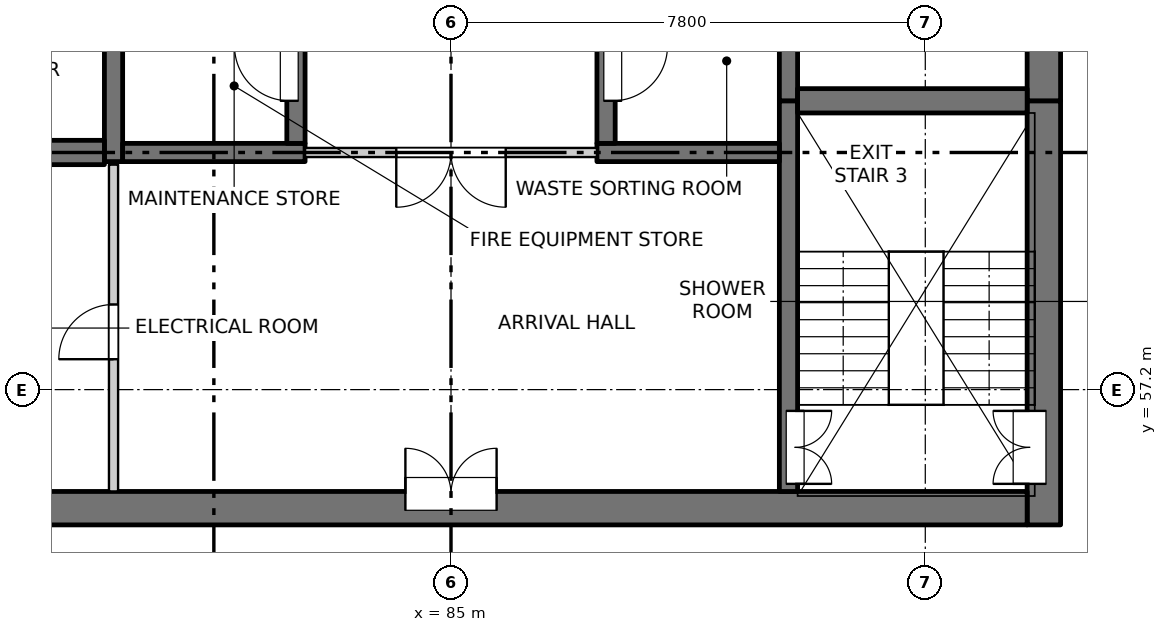
"""IFC4 building model, lengths in metres.
Left out: names, types, materials, properties, quantities, classifications, styles, units other than length and angle.
Written with IfcOpenShell. Run it as: python <this file> out.ifc"""

import sys

from ifc_helpers import new_model, si_unit, direction, frame, frame_2d, origin, place, context, subcontext, project, spatial, rectangle, extrude, element, fill, save


model = new_model("IFC4")
c1 = context("Model", 3, precision=1e-05, world=origin(), true_north=direction((0.0, 1.0)))
c2 = subcontext(c1, "Body", "Model", "MODEL_VIEW")
j1 = project(units=[si_unit("LENGTHUNIT", "METRE"), si_unit("PLANEANGLEUNIT", "RADIAN")], contexts=[c1])
p1 = place(None, origin())
s1 = spatial("IfcSite", under=j1, at=p1, CompositionType="ELEMENT")
p2 = place(p1, origin())
s2 = spatial("IfcBuilding", under=s1, at=p2, CompositionType="ELEMENT")
p3 = place(p2, frame((0.0, 0.0, 182.6)))
s3 = spatial("IfcBuildingStorey", under=s2, at=p3, CompositionType="ELEMENT", Elevation=182.6)
p4 = place(p3, frame((94.75, 54.975, -0.25), z_axis=(0.0, 0.0, 1.0), x_axis=(0.0, 1.0, 0.0)))
e1 = element("IfcWall", 1, at=p4, inside=s3, PredefinedType="SOLIDWALL", context=c2, shape_type="SweptSolid", body=[
    extrude(rectangle(XDim=6.975, YDim=0.55, at=frame_2d((3.487, 0.0))), origin(), (0.0, 0.0, 1.0), 3.4),
])
p5 = place(p4, frame((0.675, 0.0, 0.25)))
e2 = element("IfcOpeningElement", 2, at=p5, cuts=e1, PredefinedType="OPENING", context=c2, shape_type="SweptSolid", body=[
    extrude(rectangle(XDim=1.2, YDim=2.1, at=frame_2d((0.6, 1.05))), frame((0.0, 0.285, 0.0), z_axis=(0.0, -1.0, 0.0), x_axis=(1.0, 0.0, 0.0)), (0.0, 0.0, 1.0), 0.57),
])
p6 = place(p3, frame((94.75, 61.95, -0.25), z_axis=(0.0, 0.0, 1.0), x_axis=(0.0, 1.0, 0.0)))
e3 = element("IfcWall", 3, at=p6, inside=s3, PredefinedType="SOLIDWALL", context=c2, shape_type="SweptSolid", body=[
    extrude(rectangle(XDim=15.35, YDim=0.55, at=frame_2d((7.675, 0.0))), origin(), (0.0, 0.0, 1.0), 3.4),
])
p7 = place(p6, frame((0.925, 0.0, 0.25)))
e4 = element("IfcOpeningElement", 4, at=p7, cuts=e3, PredefinedType="OPENING", context=c2, shape_type="SweptSolid", body=[
    extrude(rectangle(XDim=0.9, YDim=2.1, at=frame_2d((0.45, 1.05))), frame((0.0, 0.285, 0.0), z_axis=(0.0, -1.0, 0.0), x_axis=(1.0, 0.0, 0.0)), (0.0, 0.0, 1.0), 0.57),
])
p8 = place(p6, frame((6.8, 0.0, 0.25)))
e5 = element("IfcOpeningElement", 5, at=p8, cuts=e3, PredefinedType="OPENING", context=c2, shape_type="SweptSolid", body=[
    extrude(rectangle(XDim=0.9, YDim=2.1, at=frame_2d((0.45, 1.05))), frame((0.0, 0.285, 0.0), z_axis=(0.0, -1.0, 0.0), x_axis=(1.0, 0.0, 0.0)), (0.0, 0.0, 1.0), 0.57),
])
p9 = place(p6, frame((13.1, 0.0, 0.25)))
e6 = element("IfcOpeningElement", 6, at=p9, cuts=e3, PredefinedType="OPENING", context=c2, shape_type="SweptSolid", body=[
    extrude(rectangle(XDim=0.9, YDim=2.1, at=frame_2d((0.45, 1.05))), frame((0.0, 0.285, 0.0), z_axis=(0.0, -1.0, 0.0), x_axis=(1.0, 0.0, 0.0)), (0.0, 0.0, 1.0), 0.57),
])
p10 = place(p3, frame((75.525, 55.25, -0.25), z_axis=(0.0, 0.0, 1.0), x_axis=(1.0, 0.0, 0.0)))
e7 = element("IfcWall", 7, at=p10, inside=s3, PredefinedType="SOLIDWALL", context=c2, shape_type="SweptSolid", body=[
    extrude(rectangle(XDim=18.95, YDim=0.55, at=frame_2d((9.475, 0.0))), origin(), (0.0, 0.0, 1.0), 3.4),
])
p11 = place(p10, frame((8.725, 0.0, 0.25)))
e8 = element("IfcOpeningElement", 8, at=p11, cuts=e7, PredefinedType="OPENING", context=c2, shape_type="SweptSolid", body=[
    extrude(rectangle(XDim=1.5, YDim=2.1, at=frame_2d((0.75, 1.05))), frame((0.0, 0.285, 0.0), z_axis=(0.0, -1.0, 0.0), x_axis=(1.0, 0.0, 0.0)), (0.0, 0.0, 1.0), 0.57),
])
p12 = place(p3, frame((79.45, 60.95, -0.25), z_axis=(0.0, 0.0, 1.0), x_axis=(0.0, 1.0, 0.0)))
e9 = element("IfcWall", 9, at=p12, inside=s3, PredefinedType="SOLIDWALL", context=c2, shape_type="SweptSolid", body=[
    extrude(rectangle(XDim=16.35, YDim=0.3, at=frame_2d((8.175, 0.0))), origin(), (0.0, 0.0, 1.0), 3.4),
])
p13 = place(p3, frame((90.55, 55.525, -0.25), z_axis=(0.0, 0.0, 1.0), x_axis=(0.0, 1.0, 0.0)))
e10 = element("IfcWall", 10, at=p13, inside=s3, PredefinedType="SOLIDWALL", context=c2, shape_type="SweptSolid", body=[
    extrude(rectangle(XDim=6.425, YDim=0.3, at=frame_2d((3.212, 0.0))), origin(), (0.0, 0.0, 1.0), 3.4),
])
p14 = place(p13, frame((0.125, 0.0, 0.25)))
e11 = element("IfcOpeningElement", 11, at=p14, cuts=e10, PredefinedType="OPENING", context=c2, shape_type="SweptSolid", body=[
    extrude(rectangle(XDim=1.2, YDim=2.1, at=frame_2d((0.6, 1.05))), frame((0.0, 0.16, 0.0), z_axis=(0.0, -1.0, 0.0), x_axis=(1.0, 0.0, 0.0)), (0.0, 0.0, 1.0), 0.32),
])
p15 = place(p3, frame((90.55, 61.95, -0.25), z_axis=(0.0, 0.0, 1.0), x_axis=(0.0, 1.0, 0.0)))
e12 = element("IfcWall", 12, at=p15, inside=s3, PredefinedType="SOLIDWALL", context=c2, shape_type="SweptSolid", body=[
    extrude(rectangle(XDim=15.35, YDim=0.3, at=frame_2d((7.675, 0.0))), origin(), (0.0, 0.0, 1.0), 3.4),
])
p16 = place(p3, frame((79.6, 61.1, -0.25), z_axis=(0.0, 0.0, 1.0), x_axis=(1.0, 0.0, 0.0)))
e13 = element("IfcWall", 13, at=p16, inside=s3, PredefinedType="SOLIDWALL", context=c2, shape_type="SweptSolid", body=[
    extrude(rectangle(XDim=3.0, YDim=0.3, at=frame_2d((1.5, 0.0))), origin(), (0.0, 0.0, 1.0), 3.4),
])
p17 = place(p3, frame((82.45, 61.25, -0.25), z_axis=(0.0, 0.0, 1.0), x_axis=(0.0, 1.0, 0.0)))
e14 = element("IfcWall", 14, at=p17, inside=s3, PredefinedType="SOLIDWALL", context=c2, shape_type="SweptSolid", body=[
    extrude(rectangle(XDim=2.3, YDim=0.3, at=frame_2d((1.15, 0.0))), origin(), (0.0, 0.0, 1.0), 3.4),
])
p18 = place(p17, frame((0.7, 0.0, 0.25)))
e15 = element("IfcOpeningElement", 15, at=p18, cuts=e14, PredefinedType="OPENING", context=c2, shape_type="SweptSolid", body=[
    extrude(rectangle(XDim=0.9, YDim=2.1, at=frame_2d((0.45, 1.05))), frame((0.0, 0.16, 0.0), z_axis=(0.0, -1.0, 0.0), x_axis=(1.0, 0.0, 0.0)), (0.0, 0.0, 1.0), 0.32),
])
p19 = place(p3, frame((87.4, 61.1, -0.25), z_axis=(0.0, 0.0, 1.0), x_axis=(1.0, 0.0, 0.0)))
e16 = element("IfcWall", 16, at=p19, inside=s3, PredefinedType="SOLIDWALL", context=c2, shape_type="SweptSolid", body=[
    extrude(rectangle(XDim=3.0, YDim=0.3, at=frame_2d((1.5, 0.0))), origin(), (0.0, 0.0, 1.0), 3.4),
])
p20 = place(p3, frame((87.55, 61.25, -0.25), z_axis=(0.0, 0.0, 1.0), x_axis=(0.0, 1.0, 0.0)))
e17 = element("IfcWall", 17, at=p20, inside=s3, PredefinedType="SOLIDWALL", context=c2, shape_type="SweptSolid", body=[
    extrude(rectangle(XDim=2.3, YDim=0.3, at=frame_2d((1.15, 0.0))), origin(), (0.0, 0.0, 1.0), 3.4),
])
p21 = place(p20, frame((0.7, 0.0, 0.25)))
e18 = element("IfcOpeningElement", 18, at=p21, cuts=e17, PredefinedType="OPENING", context=c2, shape_type="SweptSolid", body=[
    extrude(rectangle(XDim=0.9, YDim=2.1, at=frame_2d((0.45, 1.05))), frame((0.0, 0.16, 0.0), z_axis=(0.0, -1.0, 0.0), x_axis=(1.0, 0.0, 0.0)), (0.0, 0.0, 1.0), 0.32),
])
for number, where, z_axis, x_axis in (
    (19, (75.525, 61.1, -0.25), (0.0, 0.0, 1.0), (1.0, 0.0, 0.0)),
    (20, (90.7, 61.95, -0.25), (0.0, 0.0, 1.0), (1.0, 0.0, 0.0)),
):
    element("IfcWall", number, at=place(p3, frame(where, z_axis=z_axis, x_axis=x_axis)), inside=s3, PredefinedType="SOLIDWALL", context=c2, shape_type="SweptSolid", body=[
        extrude(rectangle(XDim=3.775, YDim=0.4, at=frame_2d((1.888, 0.0))), origin(), (0.0, 0.0, 1.0), 3.4),
    ])
p22 = place(p3, frame((82.6, 61.1, 0.0), z_axis=(0.0, 0.0, 1.0), x_axis=(1.0, 0.0, 0.0)))
e21 = element("IfcWall", 21, at=p22, inside=s3, PredefinedType="PARTITIONING", context=c2, shape_type="SweptSolid", body=[
    extrude(rectangle(XDim=4.8, YDim=0.15, at=frame_2d((2.4, 0.0))), origin(), (0.0, 0.0, 1.0), 3.15),
])
p23 = place(p22, frame((1.5, 0.0, 0.0)))
e22 = element("IfcOpeningElement", 22, at=p23, cuts=e21, PredefinedType="OPENING", context=c2, shape_type="SweptSolid", body=[
    extrude(rectangle(XDim=1.8, YDim=2.1, at=frame_2d((0.9, 1.05))), frame((0.0, 0.085, 0.0), z_axis=(0.0, -1.0, 0.0), x_axis=(1.0, 0.0, 0.0)), (0.0, 0.0, 1.0), 0.17),
])
p24 = place(p3, frame((79.45, 55.525, 0.0), z_axis=(0.0, 0.0, 1.0), x_axis=(0.0, 1.0, 0.0)))
e23 = element("IfcWall", 23, at=p24, inside=s3, PredefinedType="PARTITIONING", context=c2, shape_type="SweptSolid", body=[
    extrude(rectangle(XDim=5.375, YDim=0.15, at=frame_2d((2.688, 0.0))), origin(), (0.0, 0.0, 1.0), 3.15),
])
p25 = place(p24, frame((2.175, 0.0, 0.0)))
e24 = element("IfcOpeningElement", 24, at=p25, cuts=e23, PredefinedType="OPENING", context=c2, shape_type="SweptSolid", body=[
    extrude(rectangle(XDim=0.9, YDim=2.1, at=frame_2d((0.45, 1.05))), frame((0.0, 0.085, 0.0), z_axis=(0.0, -1.0, 0.0), x_axis=(1.0, 0.0, 0.0)), (0.0, 0.0, 1.0), 0.17),
])
p26 = place(p11, origin())
e25 = element("IfcDoor", 25, at=p26, inside=s3, OperationType="DOUBLE_DOOR_SINGLE_SWING", PredefinedType="DOOR", context=c2, shape_type="SweptSolid", body=[
    extrude(rectangle(XDim=1.5, YDim=2.1, at=frame_2d((0.75, 1.05))), frame((0.0, 0.26, 0.0), z_axis=(0.0, -1.0, 0.0), x_axis=(1.0, 0.0, 0.0)), (0.0, 0.0, 1.0), 0.05),
])
fill(e8, e25)
p27 = place(p14, origin())
e26 = element("IfcDoor", 26, at=p27, inside=s3, OperationType="DOUBLE_DOOR_SINGLE_SWING", PredefinedType="DOOR", context=c2, shape_type="SweptSolid", body=[
    extrude(rectangle(XDim=1.2, YDim=2.1, at=frame_2d((0.6, 1.05))), frame((0.0, -0.085, 0.0), z_axis=(0.0, -1.0, 0.0), x_axis=(1.0, 0.0, 0.0)), (0.0, 0.0, 1.0), 0.05),
])
fill(e11, e26)
p28 = place(p5, origin())
e27 = element("IfcDoor", 27, at=p28, inside=s3, OperationType="DOUBLE_DOOR_SINGLE_SWING", PredefinedType="DOOR", context=c2, shape_type="SweptSolid", body=[
    extrude(rectangle(XDim=1.2, YDim=2.1, at=frame_2d((0.6, 1.05))), frame((0.0, 0.26, 0.0), z_axis=(0.0, -1.0, 0.0), x_axis=(1.0, 0.0, 0.0)), (0.0, 0.0, 1.0), 0.05),
])
fill(e2, e27)
p29 = place(p25, origin())
e28 = element("IfcDoor", 28, at=p29, inside=s3, OperationType="SINGLE_SWING_LEFT", PredefinedType="DOOR", context=c2, shape_type="SweptSolid", body=[
    extrude(rectangle(XDim=0.9, YDim=2.1, at=frame_2d((0.45, 1.05))), frame((0.0, 0.025, 0.0), z_axis=(0.0, -1.0, 0.0), x_axis=(1.0, 0.0, 0.0)), (0.0, 0.0, 1.0), 0.05),
])
fill(e24, e28)
p30 = place(p23, origin())
e29 = element("IfcDoor", 29, at=p30, inside=s3, OperationType="DOUBLE_DOOR_SINGLE_SWING", PredefinedType="DOOR", context=c2, shape_type="SweptSolid", body=[
    extrude(rectangle(XDim=1.8, YDim=2.1, at=frame_2d((0.9, 1.05))), frame((0.0, 0.025, 0.0), z_axis=(0.0, -1.0, 0.0), x_axis=(1.0, 0.0, 0.0)), (0.0, 0.0, 1.0), 0.05),
])
fill(e22, e29)
p31 = place(p18, origin())
e30 = element("IfcDoor", 30, at=p31, inside=s3, OperationType="SINGLE_SWING_RIGHT", PredefinedType="DOOR", context=c2, shape_type="SweptSolid", body=[
    extrude(rectangle(XDim=0.9, YDim=2.1, at=frame_2d((0.45, 1.05))), frame((0.0, 0.135, 0.0), z_axis=(0.0, -1.0, 0.0), x_axis=(1.0, 0.0, 0.0)), (0.0, 0.0, 1.0), 0.05),
])
fill(e15, e30)
p32 = place(p21, origin())
e31 = element("IfcDoor", 31, at=p32, inside=s3, OperationType="SINGLE_SWING_LEFT", PredefinedType="DOOR", context=c2, shape_type="SweptSolid", body=[
    extrude(rectangle(XDim=0.9, YDim=2.1, at=frame_2d((0.45, 1.05))), frame((0.0, -0.085, 0.0), z_axis=(0.0, -1.0, 0.0), x_axis=(1.0, 0.0, 0.0)), (0.0, 0.0, 1.0), 0.05),
])
fill(e18, e31)
save(model, sys.argv[1])
